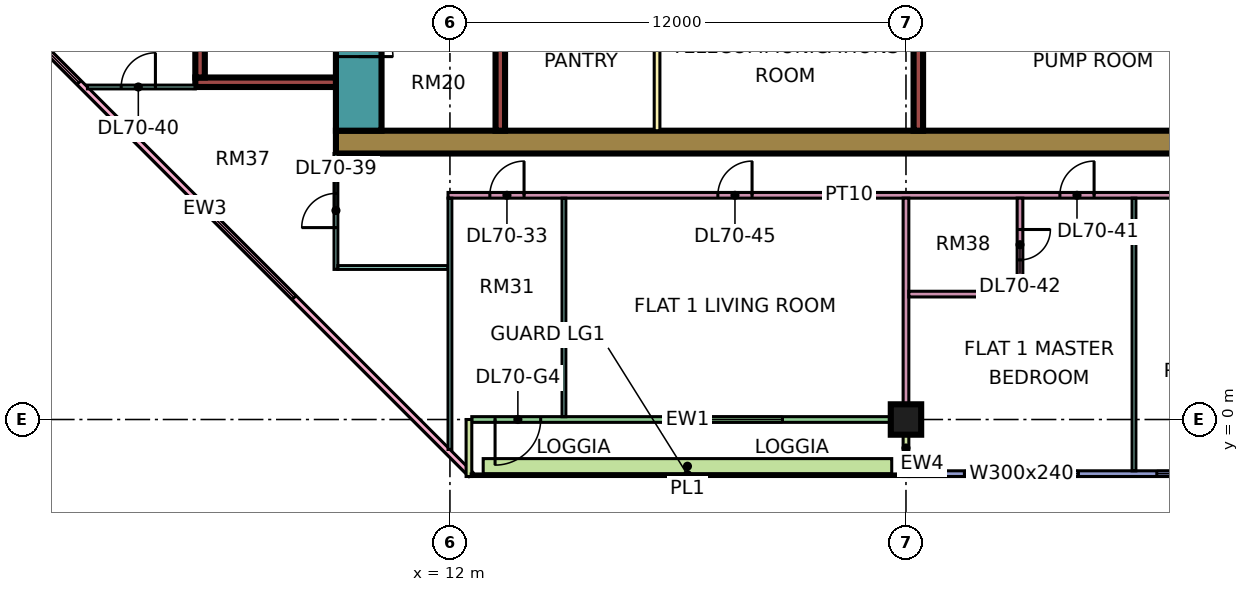
"""IFC4 building model, lengths in metres.
Left out: names, types, materials, properties, quantities, classifications, styles, units other than length and angle.
Written with IfcOpenShell. Run it as: python <this file> out.ifc"""

import sys

from ifc_helpers import new_model, si_unit, direction, frame, frame_2d, origin, origin_2d, place, context, subcontext, project, spatial, rectangle, extrude, element, fill, save


model = new_model("IFC4")
c1 = context("Model", 3, precision=1e-05, world=origin(), true_north=direction((0.0, 1.0)))
c2 = subcontext(c1, "Body", "Model", "MODEL_VIEW")
j1 = project(units=[si_unit("LENGTHUNIT", "METRE"), si_unit("PLANEANGLEUNIT", "RADIAN")], contexts=[c1])
p1 = place(None, origin())
s1 = spatial("IfcSite", under=j1, at=p1, CompositionType="ELEMENT")
p2 = place(p1, origin())
s2 = spatial("IfcBuilding", under=s1, at=p2, CompositionType="ELEMENT")
p3 = place(p2, frame((0.0, 0.0, 299.65)))
s3 = spatial("IfcBuildingStorey", under=s2, at=p3, CompositionType="ELEMENT", Elevation=299.65)
p4 = place(p3, frame((24.0, 0.0, 0.0), z_axis=(0.0, 0.0, 1.0), x_axis=(1.0, 0.0, 0.0)))
e1 = element("IfcColumn", 1, at=p4, inside=s3, PredefinedType="COLUMN", context=c2, shape_type="SweptSolid", body=[
    extrude(rectangle(XDim=0.8, YDim=0.8, at=origin_2d()), origin(), (0.0, 0.0, 1.0), 3.75),
])
p5 = place(p3, frame((9.0, 7.3, 0.0), z_axis=(0.0, 0.0, 1.0), x_axis=(1.0, 0.0, 0.0)))
e2 = element("IfcWall", 2, at=p5, inside=s3, PredefinedType="SHEAR", context=c2, shape_type="SweptSolid", body=[
    extrude(rectangle(XDim=25.0, YDim=0.6, at=frame_2d((12.5, 0.0))), origin(), (0.0, 0.0, 1.0), 3.75),
])
p6 = place(p3, frame((9.6, 7.6, 0.0), z_axis=(0.0, 0.0, 1.0), x_axis=(0.0, 1.0, 0.0)))
e3 = element("IfcWall", 3, at=p6, inside=s3, PredefinedType="SHEAR", context=c2, shape_type="SweptSolid", body=[
    extrude(rectangle(XDim=11.8, YDim=1.2, at=frame_2d((5.9, 0.0))), origin(), (0.0, 0.0, 1.0), 3.75),
])
p7 = place(p6, frame((4.275, 0.0, 0.0)))
e4 = element("IfcOpeningElement", 4, at=p7, cuts=e3, PredefinedType="OPENING", context=c2, shape_type="SweptSolid", body=[
    extrude(rectangle(XDim=1.1, YDim=2.2, at=frame_2d((0.55, 1.1))), frame((0.0, 0.61, 0.0), z_axis=(0.0, -1.0, 0.0), x_axis=(1.0, 0.0, 0.0)), (0.0, 0.0, 1.0), 1.22),
])
p8 = place(p6, frame((6.775, 0.0, 0.0)))
e5 = element("IfcOpeningElement", 5, at=p8, cuts=e3, PredefinedType="OPENING", context=c2, shape_type="SweptSolid", body=[
    extrude(rectangle(XDim=1.1, YDim=2.2, at=frame_2d((0.55, 1.1))), frame((0.0, 0.61, 0.0), z_axis=(0.0, -1.0, 0.0), x_axis=(1.0, 0.0, 0.0)), (0.0, 0.0, 1.0), 1.22),
])
p9 = place(p6, frame((9.7, 0.0, 0.0)))
e6 = element("IfcOpeningElement", 6, at=p9, cuts=e3, PredefinedType="OPENING", context=c2, shape_type="SweptSolid", body=[
    extrude(rectangle(XDim=1.1, YDim=2.2, at=frame_2d((0.55, 1.1))), frame((0.0, 0.61, 0.0), z_axis=(0.0, -1.0, 0.0), x_axis=(1.0, 0.0, 0.0)), (0.0, 0.0, 1.0), 1.22),
])
p10 = place(p6, frame((1.95, 0.0, 0.0)))
e7 = element("IfcOpeningElement", 7, at=p10, cuts=e3, PredefinedType="OPENING", context=c2, shape_type="SweptSolid", body=[
    extrude(rectangle(XDim=0.9, YDim=2.1, at=frame_2d((0.45, 1.05))), frame((0.0, 0.61, 0.0), z_axis=(0.0, -1.0, 0.0), x_axis=(1.0, 0.0, 0.0)), (0.0, 0.0, 1.0), 1.22),
])
p11 = place(p3, frame((13.325, 7.6, 0.0), z_axis=(0.0, 0.0, 1.0), x_axis=(0.0, 1.0, 0.0)))
e8 = element("IfcWall", 8, at=p11, inside=s3, PredefinedType="SHEAR", context=c2, shape_type="SweptSolid", body=[
    extrude(rectangle(XDim=11.8, YDim=0.25, at=frame_2d((5.9, 0.0))), origin(), (0.0, 0.0, 1.0), 3.75),
])
p12 = place(p3, frame((24.325, 7.6, 0.0), z_axis=(0.0, 0.0, 1.0), x_axis=(0.0, 1.0, 0.0)))
e9 = element("IfcWall", 9, at=p12, inside=s3, PredefinedType="SHEAR", context=c2, shape_type="SweptSolid", body=[
    extrude(rectangle(XDim=3.6, YDim=0.25, at=frame_2d((1.8, 0.0))), origin(), (0.0, 0.0, 1.0), 3.75),
])
p13 = place(p3, frame((5.3, 8.875, 0.0), z_axis=(0.0, 0.0, 1.0), x_axis=(1.0, 0.0, 0.0)))
e10 = element("IfcWall", 10, at=p13, inside=s3, PredefinedType="SHEAR", context=c2, shape_type="SweptSolid", body=[
    extrude(rectangle(XDim=3.7, YDim=0.25, at=frame_2d((1.85, 0.0))), origin(), (0.0, 0.0, 1.0), 3.75),
])
p14 = place(p3, frame((5.425, 9.0, 0.0), z_axis=(0.0, 0.0, 1.0), x_axis=(0.0, 1.0, 0.0)))
e11 = element("IfcWall", 11, at=p14, inside=s3, PredefinedType="SHEAR", context=c2, shape_type="SweptSolid", body=[
    extrude(rectangle(XDim=4.0, YDim=0.25, at=frame_2d((2.0, 0.0))), origin(), (0.0, 0.0, 1.0), 3.75),
])
p15 = place(p3, frame((-1.447, 12.553, 0.0), z_axis=(0.0, 0.0, 1.0), x_axis=(0.707106781187, -0.707106781187, 0.0)))
e12 = element("IfcWall", 12, at=p15, inside=s3, PredefinedType="SOLIDWALL", context=c2, shape_type="SweptSolid", body=[
    extrude(rectangle(XDim=19.799, YDim=0.15, at=frame_2d((9.899, 0.0))), origin(), (0.0, 0.0, 1.0), 3.35),
])
p16 = place(p15, frame((2.212, 0.0, 0.45)))
e13 = element("IfcOpeningElement", 13, at=p16, cuts=e12, PredefinedType="OPENING", context=c2, shape_type="SweptSolid", body=[
    extrude(rectangle(XDim=3.0, YDim=2.4, at=frame_2d((1.5, 1.2))), frame((0.0, 0.085, 0.0), z_axis=(0.0, -1.0, 0.0), x_axis=(1.0, 0.0, 0.0)), (0.0, 0.0, 1.0), 0.17),
])
p17 = place(p15, frame((10.216, 0.0, 0.45)))
e14 = element("IfcOpeningElement", 14, at=p17, cuts=e12, PredefinedType="OPENING", context=c2, shape_type="SweptSolid", body=[
    extrude(rectangle(XDim=3.0, YDim=2.4, at=frame_2d((1.5, 1.2))), frame((0.0, 0.085, 0.0), z_axis=(0.0, -1.0, 0.0), x_axis=(1.0, 0.0, 0.0)), (0.0, 0.0, 1.0), 0.17),
])
p18 = place(p3, frame((12.575, 0.0, 0.0), z_axis=(0.0, 0.0, 1.0), x_axis=(1.0, 0.0, 0.0)))
e15 = element("IfcWall", 15, at=p18, inside=s3, PredefinedType="SOLIDWALL", context=c2, shape_type="SweptSolid", body=[
    extrude(rectangle(XDim=11.35, YDim=0.15, at=frame_2d((5.675, 0.0))), origin(), (0.0, 0.0, 1.0), 3.35),
])
p19 = place(p18, frame((0.613, 0.0, 0.0)))
e16 = element("IfcOpeningElement", 16, at=p19, cuts=e15, PredefinedType="OPENING", context=c2, shape_type="SweptSolid", body=[
    extrude(rectangle(XDim=1.2, YDim=2.4, at=frame_2d((0.6, 1.2))), frame((0.0, 0.085, 0.0), z_axis=(0.0, -1.0, 0.0), x_axis=(1.0, 0.0, 0.0)), (0.0, 0.0, 1.0), 0.17),
])
p20 = place(p18, frame((5.175, 0.0, 0.45)))
e17 = element("IfcOpeningElement", 17, at=p20, cuts=e15, PredefinedType="OPENING", context=c2, shape_type="SweptSolid", body=[
    extrude(rectangle(XDim=3.0, YDim=2.4, at=frame_2d((1.5, 1.2))), frame((0.0, 0.085, 0.0), z_axis=(0.0, -1.0, 0.0), x_axis=(1.0, 0.0, 0.0)), (0.0, 0.0, 1.0), 0.17),
])
for number, where, z_axis, x_axis in (
    (18, (12.5, -1.5, 0.0), (0.0, 0.0, 1.0), (0.0, 1.0, 0.0)),
    (19, (24.0, -1.5, 0.0), (0.0, 0.0, 1.0), (0.0, 1.0, 0.0)),
):
    element("IfcWall", number, at=place(p3, frame(where, z_axis=z_axis, x_axis=x_axis)), inside=s3, PredefinedType="SOLIDWALL", context=c2, shape_type="SweptSolid", body=[
        extrude(rectangle(XDim=1.5, YDim=0.15, at=frame_2d((0.75, 0.0))), origin(), (0.0, 0.0, 1.0), 3.35),
    ])
p21 = place(p3, frame((24.075, -1.425, 0.0), z_axis=(0.0, 0.0, 1.0), x_axis=(1.0, 0.0, 0.0)))
e20 = element("IfcWall", 20, at=p21, inside=s3, PredefinedType="SOLIDWALL", context=c2, shape_type="SweptSolid", body=[
    extrude(rectangle(XDim=11.85, YDim=0.15, at=frame_2d((5.925, 0.0))), origin(), (0.0, 0.0, 1.0), 3.35),
])
p22 = place(p21, frame((1.462, 0.0, 0.45)))
e21 = element("IfcOpeningElement", 21, at=p22, cuts=e20, PredefinedType="OPENING", context=c2, shape_type="SweptSolid", body=[
    extrude(rectangle(XDim=3.0, YDim=2.4, at=frame_2d((1.5, 1.2))), frame((0.0, 0.085, 0.0), z_axis=(0.0, -1.0, 0.0), x_axis=(1.0, 0.0, 0.0)), (0.0, 0.0, 1.0), 0.17),
])
p23 = place(p21, frame((6.525, 0.0, 0.45)))
e22 = element("IfcOpeningElement", 22, at=p23, cuts=e20, PredefinedType="OPENING", context=c2, shape_type="SweptSolid", body=[
    extrude(rectangle(XDim=1.8, YDim=2.4, at=frame_2d((0.9, 1.2))), frame((0.0, 0.085, 0.0), z_axis=(0.0, -1.0, 0.0), x_axis=(1.0, 0.0, 0.0)), (0.0, 0.0, 1.0), 0.17),
])
p24 = place(p21, frame((9.488, 0.0, 0.45)))
e23 = element("IfcOpeningElement", 23, at=p24, cuts=e20, PredefinedType="OPENING", context=c2, shape_type="SweptSolid", body=[
    extrude(rectangle(XDim=1.8, YDim=2.4, at=frame_2d((0.9, 1.2))), frame((0.0, 0.085, 0.0), z_axis=(0.0, -1.0, 0.0), x_axis=(1.0, 0.0, 0.0)), (0.0, 0.0, 1.0), 0.17),
])
p25 = place(p3, frame((12.875, -1.229, 0.0), z_axis=(0.0, 0.0, 1.0), x_axis=(1.0, 0.0, 0.0)))
e24 = element("IfcWall", 24, at=p25, inside=s3, PredefinedType="SOLIDWALL", context=c2, shape_type="SweptSolid", body=[
    extrude(rectangle(XDim=10.75, YDim=0.4, at=frame_2d((5.375, 0.0))), origin(), (0.0, 0.0, 1.0), 0.7),
])
p26 = place(p3, frame((17.45, 7.6, 0.0), z_axis=(0.0, 0.0, 1.0), x_axis=(0.0, 1.0, 0.0)))
e25 = element("IfcWall", 25, at=p26, inside=s3, PredefinedType="PARTITIONING", context=c2, shape_type="SweptSolid", body=[
    extrude(rectangle(XDim=3.6, YDim=0.15, at=frame_2d((1.8, 0.0))), origin(), (0.0, 0.0, 1.0), 3.35),
])
p27 = place(p3, frame((2.461, 8.75, 0.0), z_axis=(0.0, 0.0, 1.0), x_axis=(1.0, 0.0, 0.0)))
e26 = element("IfcWall", 26, at=p27, inside=s3, PredefinedType="PARTITIONING", context=c2, shape_type="SweptSolid", body=[
    extrude(rectangle(XDim=2.839, YDim=0.1, at=frame_2d((1.419, 0.0))), origin(), (0.0, 0.0, 1.0), 3.35),
])
p28 = place(p27, frame((0.889, 0.0, 0.0)))
e27 = element("IfcOpeningElement", 27, at=p28, cuts=e26, PredefinedType="OPENING", context=c2, shape_type="SweptSolid", body=[
    extrude(rectangle(XDim=0.9, YDim=2.1, at=frame_2d((0.45, 1.05))), frame((0.0, 0.06, 0.0), z_axis=(0.0, -1.0, 0.0), x_axis=(1.0, 0.0, 0.0)), (0.0, 0.0, 1.0), 0.12),
])
p29 = place(p3, frame((9.0, 3.95, 0.0), z_axis=(0.0, 0.0, 1.0), x_axis=(0.0, 1.0, 0.0)))
e28 = element("IfcWall", 28, at=p29, inside=s3, PredefinedType="PARTITIONING", context=c2, shape_type="SweptSolid", body=[
    extrude(rectangle(XDim=3.05, YDim=0.1, at=frame_2d((1.525, 0.0))), origin(), (0.0, 0.0, 1.0), 3.35),
])
p30 = place(p29, frame((1.1, 0.0, 0.0)))
e29 = element("IfcOpeningElement", 29, at=p30, cuts=e28, PredefinedType="OPENING", context=c2, shape_type="SweptSolid", body=[
    extrude(rectangle(XDim=0.9, YDim=2.1, at=frame_2d((0.45, 1.05))), frame((0.0, 0.06, 0.0), z_axis=(0.0, -1.0, 0.0), x_axis=(1.0, 0.0, 0.0)), (0.0, 0.0, 1.0), 0.12),
])
p31 = place(p3, frame((9.05, 4.0, 0.0), z_axis=(0.0, 0.0, 1.0), x_axis=(1.0, 0.0, 0.0)))
e30 = element("IfcWall", 30, at=p31, inside=s3, PredefinedType="PARTITIONING", context=c2, shape_type="SweptSolid", body=[
    extrude(rectangle(XDim=2.9, YDim=0.1, at=frame_2d((1.45, 0.0))), origin(), (0.0, 0.0, 1.0), 3.35),
])
p32 = place(p3, frame((11.95, 5.9, 0.0), z_axis=(0.0, 0.0, 1.0), x_axis=(1.0, 0.0, 0.0)))
e31 = element("IfcWall", 31, at=p32, inside=s3, PredefinedType="PARTITIONING", context=c2, shape_type="SweptSolid", body=[
    extrude(rectangle(XDim=21.1, YDim=0.15, at=frame_2d((10.55, 0.0))), origin(), (0.0, 0.0, 1.0), 3.35),
])
p33 = place(p32, frame((1.1, 0.0, 0.0)))
e32 = element("IfcOpeningElement", 32, at=p33, cuts=e31, PredefinedType="OPENING", context=c2, shape_type="SweptSolid", body=[
    extrude(rectangle(XDim=0.9, YDim=2.1, at=frame_2d((0.45, 1.05))), frame((0.0, 0.085, 0.0), z_axis=(0.0, -1.0, 0.0), x_axis=(1.0, 0.0, 0.0)), (0.0, 0.0, 1.0), 0.17),
])
p34 = place(p32, frame((16.1, 0.0, 0.0)))
e33 = element("IfcOpeningElement", 33, at=p34, cuts=e31, PredefinedType="OPENING", context=c2, shape_type="SweptSolid", body=[
    extrude(rectangle(XDim=0.9, YDim=2.1, at=frame_2d((0.45, 1.05))), frame((0.0, 0.085, 0.0), z_axis=(0.0, -1.0, 0.0), x_axis=(1.0, 0.0, 0.0)), (0.0, 0.0, 1.0), 0.17),
])
p35 = place(p32, frame((7.1, 0.0, 0.0)))
e34 = element("IfcOpeningElement", 34, at=p35, cuts=e31, PredefinedType="OPENING", context=c2, shape_type="SweptSolid", body=[
    extrude(rectangle(XDim=0.9, YDim=2.1, at=frame_2d((0.45, 1.05))), frame((0.0, 0.085, 0.0), z_axis=(0.0, -1.0, 0.0), x_axis=(1.0, 0.0, 0.0)), (0.0, 0.0, 1.0), 0.17),
])
p36 = place(p3, frame((12.0, -0.788, 0.0), z_axis=(0.0, 0.0, 1.0), x_axis=(0.0, 1.0, 0.0)))
e35 = element("IfcWall", 35, at=p36, inside=s3, PredefinedType="PARTITIONING", context=c2, shape_type="SweptSolid", body=[
    extrude(rectangle(XDim=6.613, YDim=0.1, at=frame_2d((3.306, 0.0))), origin(), (0.0, 0.0, 1.0), 3.35),
])
p37 = place(p3, frame((15.0, 0.074, 0.0), z_axis=(0.0, 0.0, 1.0), x_axis=(0.0, 1.0, 0.0)))
e36 = element("IfcWall", 36, at=p37, inside=s3, PredefinedType="PARTITIONING", context=c2, shape_type="SweptSolid", body=[
    extrude(rectangle(XDim=5.751, YDim=0.1, at=frame_2d((2.875, 0.0))), origin(), (0.0, 0.0, 1.0), 3.35),
])
p38 = place(p3, frame((24.0, 0.0, 0.0), z_axis=(0.0, 0.0, 1.0), x_axis=(0.0, 1.0, 0.0)))
e37 = element("IfcWall", 37, at=p38, inside=s3, PredefinedType="PARTITIONING", context=c2, shape_type="SweptSolid", body=[
    extrude(rectangle(XDim=5.825, YDim=0.15, at=frame_2d((2.913, 0.0))), origin(), (0.0, 0.0, 1.0), 3.35),
])
p39 = place(p3, frame((24.075, 3.3, 0.0), z_axis=(0.0, 0.0, 1.0), x_axis=(1.0, 0.0, 0.0)))
e38 = element("IfcWall", 38, at=p39, inside=s3, PredefinedType="PARTITIONING", context=c2, shape_type="SweptSolid", body=[
    extrude(rectangle(XDim=3.0, YDim=0.15, at=frame_2d((1.5, 0.0))), origin(), (0.0, 0.0, 1.0), 3.35),
])
p40 = place(p3, frame((27.0, 3.375, 0.0), z_axis=(0.0, 0.0, 1.0), x_axis=(0.0, 1.0, 0.0)))
e39 = element("IfcWall", 39, at=p40, inside=s3, PredefinedType="PARTITIONING", context=c2, shape_type="SweptSolid", body=[
    extrude(rectangle(XDim=2.45, YDim=0.15, at=frame_2d((1.225, 0.0))), origin(), (0.0, 0.0, 1.0), 3.35),
])
p41 = place(p40, frame((0.825, 0.0, 0.0)))
e40 = element("IfcOpeningElement", 40, at=p41, cuts=e39, PredefinedType="OPENING", context=c2, shape_type="SweptSolid", body=[
    extrude(rectangle(XDim=0.8, YDim=2.1, at=frame_2d((0.4, 1.05))), frame((0.0, 0.085, 0.0), z_axis=(0.0, -1.0, 0.0), x_axis=(1.0, 0.0, 0.0)), (0.0, 0.0, 1.0), 0.17),
])
p42 = place(p3, frame((30.0, -1.351, 0.0), z_axis=(0.0, 0.0, 1.0), x_axis=(0.0, 1.0, 0.0)))
e41 = element("IfcWall", 41, at=p42, inside=s3, PredefinedType="PARTITIONING", context=c2, shape_type="SweptSolid", body=[
    extrude(rectangle(XDim=7.176, YDim=0.1, at=frame_2d((3.588, 0.0))), origin(), (0.0, 0.0, 1.0), 3.35),
])
p43 = place(p16, origin())
e42 = element("IfcWindow", 42, at=p43, inside=s3, PartitioningType="SINGLE_PANEL", PredefinedType="WINDOW", context=c2, shape_type="SweptSolid", body=[
    extrude(rectangle(XDim=3.0, YDim=2.4, at=frame_2d((1.5, 1.2))), frame((0.0, 0.03, 0.0), z_axis=(0.0, -1.0, 0.0), x_axis=(1.0, 0.0, 0.0)), (0.0, 0.0, 1.0), 0.06),
])
fill(e13, e42)
p44 = place(p17, origin())
e43 = element("IfcWindow", 43, at=p44, inside=s3, PartitioningType="SINGLE_PANEL", PredefinedType="WINDOW", context=c2, shape_type="SweptSolid", body=[
    extrude(rectangle(XDim=3.0, YDim=2.4, at=frame_2d((1.5, 1.2))), frame((0.0, 0.03, 0.0), z_axis=(0.0, -1.0, 0.0), x_axis=(1.0, 0.0, 0.0)), (0.0, 0.0, 1.0), 0.06),
])
fill(e14, e43)
p45 = place(p19, frame((1.2, 0.0, 0.0), z_axis=(0.0, 0.0, 1.0), x_axis=(-1.0, 0.0, 0.0)))
e44 = element("IfcDoor", 44, at=p45, inside=s3, OperationType="DOUBLE_DOOR_SINGLE_SWING", PredefinedType="DOOR", context=c2, shape_type="SweptSolid", body=[
    extrude(rectangle(XDim=1.2, YDim=2.4, at=frame_2d((0.6, 1.2))), frame((0.0, 0.025, 0.0), z_axis=(0.0, -1.0, 0.0), x_axis=(1.0, 0.0, 0.0)), (0.0, 0.0, 1.0), 0.05),
])
fill(e16, e44)
p46 = place(p20, origin())
e45 = element("IfcWindow", 45, at=p46, inside=s3, PartitioningType="SINGLE_PANEL", PredefinedType="WINDOW", context=c2, shape_type="SweptSolid", body=[
    extrude(rectangle(XDim=3.0, YDim=2.4, at=frame_2d((1.5, 1.2))), frame((0.0, 0.03, 0.0), z_axis=(0.0, -1.0, 0.0), x_axis=(1.0, 0.0, 0.0)), (0.0, 0.0, 1.0), 0.06),
])
fill(e17, e45)
p47 = place(p22, origin())
e46 = element("IfcWindow", 46, at=p47, inside=s3, PartitioningType="SINGLE_PANEL", PredefinedType="WINDOW", context=c2, shape_type="SweptSolid", body=[
    extrude(rectangle(XDim=3.0, YDim=2.4, at=frame_2d((1.5, 1.2))), frame((0.0, 0.03, 0.0), z_axis=(0.0, -1.0, 0.0), x_axis=(1.0, 0.0, 0.0)), (0.0, 0.0, 1.0), 0.06),
])
fill(e21, e46)
p48 = place(p23, origin())
e47 = element("IfcWindow", 47, at=p48, inside=s3, PartitioningType="SINGLE_PANEL", PredefinedType="WINDOW", context=c2, shape_type="SweptSolid", body=[
    extrude(rectangle(XDim=1.8, YDim=2.4, at=frame_2d((0.9, 1.2))), frame((0.0, 0.03, 0.0), z_axis=(0.0, -1.0, 0.0), x_axis=(1.0, 0.0, 0.0)), (0.0, 0.0, 1.0), 0.06),
])
fill(e22, e47)
p49 = place(p10, frame((0.9, 0.0, 0.0), z_axis=(0.0, 0.0, 1.0), x_axis=(-1.0, 0.0, 0.0)))
e48 = element("IfcDoor", 48, at=p49, inside=s3, OperationType="SINGLE_SWING_LEFT", PredefinedType="DOOR", context=c2, shape_type="SweptSolid", body=[
    extrude(rectangle(XDim=0.9, YDim=2.1, at=frame_2d((0.45, 1.05))), frame((0.0, 0.025, 0.0), z_axis=(0.0, -1.0, 0.0), x_axis=(1.0, 0.0, 0.0)), (0.0, 0.0, 1.0), 0.05),
])
fill(e7, e48)
p50 = place(p33, frame((0.9, 0.0, 0.0), z_axis=(0.0, 0.0, 1.0), x_axis=(-1.0, 0.0, 0.0)))
e49 = element("IfcDoor", 49, at=p50, inside=s3, OperationType="SINGLE_SWING_RIGHT", PredefinedType="DOOR", context=c2, shape_type="SweptSolid", body=[
    extrude(rectangle(XDim=0.9, YDim=2.1, at=frame_2d((0.45, 1.05))), frame((0.0, 0.025, 0.0), z_axis=(0.0, -1.0, 0.0), x_axis=(1.0, 0.0, 0.0)), (0.0, 0.0, 1.0), 0.05),
])
fill(e32, e49)
p51 = place(p30, origin())
e50 = element("IfcDoor", 50, at=p51, inside=s3, OperationType="SINGLE_SWING_LEFT", PredefinedType="DOOR", context=c2, shape_type="SweptSolid", body=[
    extrude(rectangle(XDim=0.9, YDim=2.1, at=frame_2d((0.45, 1.05))), frame((0.0, 0.025, 0.0), z_axis=(0.0, -1.0, 0.0), x_axis=(1.0, 0.0, 0.0)), (0.0, 0.0, 1.0), 0.05),
])
fill(e29, e50)
p52 = place(p28, frame((0.9, 0.0, 0.0), z_axis=(0.0, 0.0, 1.0), x_axis=(-1.0, 0.0, 0.0)))
e51 = element("IfcDoor", 51, at=p52, inside=s3, OperationType="SINGLE_SWING_RIGHT", PredefinedType="DOOR", context=c2, shape_type="SweptSolid", body=[
    extrude(rectangle(XDim=0.9, YDim=2.1, at=frame_2d((0.45, 1.05))), frame((0.0, 0.025, 0.0), z_axis=(0.0, -1.0, 0.0), x_axis=(1.0, 0.0, 0.0)), (0.0, 0.0, 1.0), 0.05),
])
fill(e27, e51)
p53 = place(p34, frame((0.9, 0.0, 0.0), z_axis=(0.0, 0.0, 1.0), x_axis=(-1.0, 0.0, 0.0)))
e52 = element("IfcDoor", 52, at=p53, inside=s3, OperationType="SINGLE_SWING_RIGHT", PredefinedType="DOOR", context=c2, shape_type="SweptSolid", body=[
    extrude(rectangle(XDim=0.9, YDim=2.1, at=frame_2d((0.45, 1.05))), frame((0.0, 0.025, 0.0), z_axis=(0.0, -1.0, 0.0), x_axis=(1.0, 0.0, 0.0)), (0.0, 0.0, 1.0), 0.05),
])
fill(e33, e52)
p54 = place(p41, origin())
e53 = element("IfcDoor", 53, at=p54, inside=s3, OperationType="SINGLE_SWING_RIGHT", PredefinedType="DOOR", context=c2, shape_type="SweptSolid", body=[
    extrude(rectangle(XDim=0.8, YDim=2.1, at=frame_2d((0.4, 1.05))), frame((0.0, 0.025, 0.0), z_axis=(0.0, -1.0, 0.0), x_axis=(1.0, 0.0, 0.0)), (0.0, 0.0, 1.0), 0.05),
])
fill(e40, e53)
p55 = place(p35, frame((0.9, 0.0, 0.0), z_axis=(0.0, 0.0, 1.0), x_axis=(-1.0, 0.0, 0.0)))
e54 = element("IfcDoor", 54, at=p55, inside=s3, OperationType="SINGLE_SWING_RIGHT", PredefinedType="DOOR", context=c2, shape_type="SweptSolid", body=[
    extrude(rectangle(XDim=0.9, YDim=2.1, at=frame_2d((0.45, 1.05))), frame((0.0, 0.025, 0.0), z_axis=(0.0, -1.0, 0.0), x_axis=(1.0, 0.0, 0.0)), (0.0, 0.0, 1.0), 0.05),
])
fill(e34, e54)
save(model, sys.argv[1])
